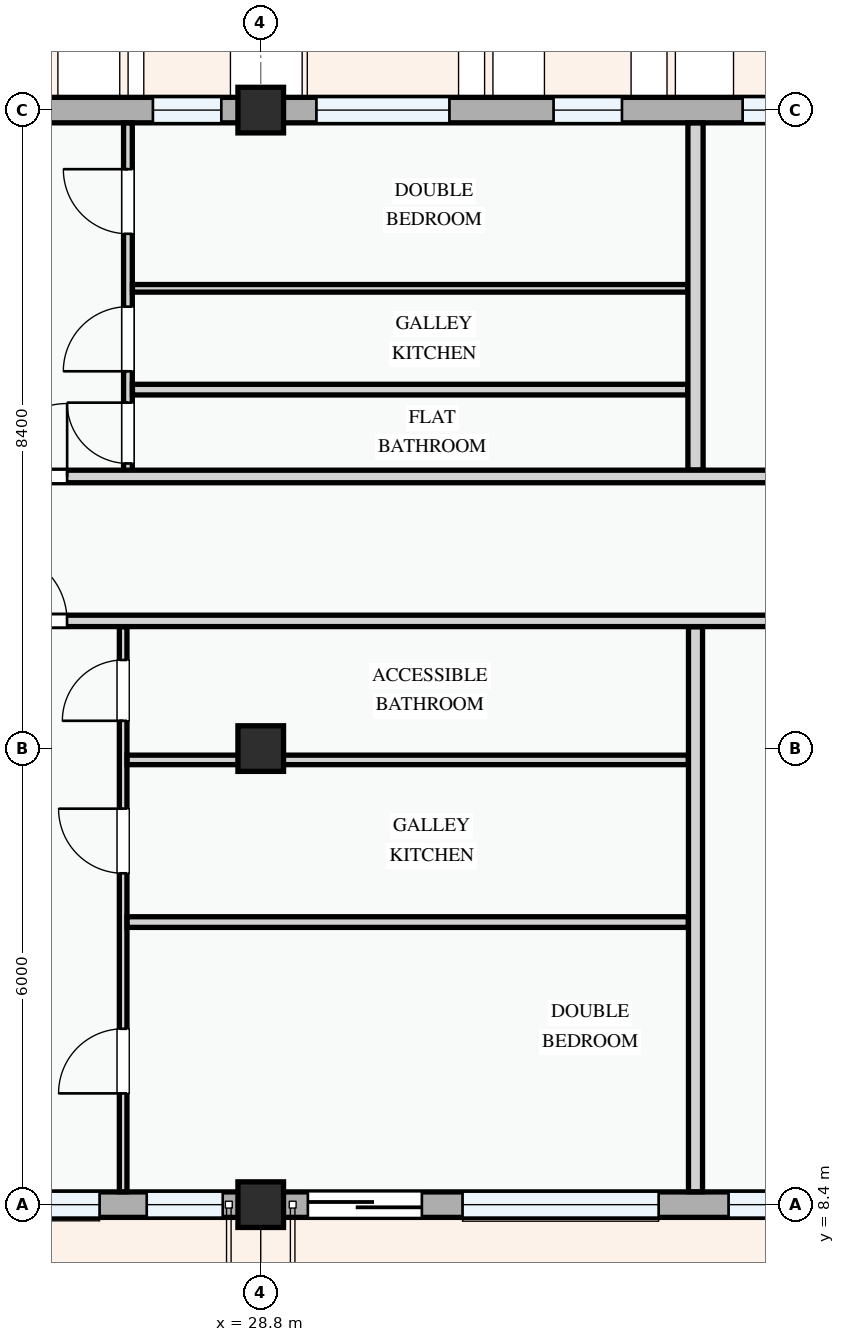
"""IFC4 building model, lengths in metres.
Left out: names, types, materials, properties, quantities, classifications, styles, units other than length and angle.
Written with IfcOpenShell. Run it as: python <this file> out.ifc"""

import sys

from ifc_helpers import new_model, si_unit, direction, frame, frame_2d, origin, origin_2d, place, context, subcontext, project, spatial, rectangle, extrude, element, fill, save


model = new_model("IFC4")
c1 = context("Model", 3, precision=1e-05, world=origin(), true_north=direction((0.0, 1.0)))
c2 = subcontext(c1, "Body", "Model", "MODEL_VIEW")
j1 = project(units=[si_unit("LENGTHUNIT", "METRE"), si_unit("PLANEANGLEUNIT", "RADIAN")], contexts=[c1])
p1 = place(None, origin())
s1 = spatial("IfcSite", under=j1, at=p1, CompositionType="ELEMENT")
p2 = place(p1, origin())
s2 = spatial("IfcBuilding", under=s1, at=p2, CompositionType="ELEMENT")
p3 = place(p2, frame((0.0, 0.0, 11.4)))
s3 = spatial("IfcBuildingStorey", under=s2, at=p3, CompositionType="ELEMENT", Elevation=11.4)
for number, where, z_axis, x_axis in (
    (1, (28.8, 8.4, 0.0), (0.0, 0.0, 1.0), (1.0, 0.0, 0.0)),
    (2, (28.8, 14.4, 0.0), (0.0, 0.0, 1.0), (1.0, 0.0, 0.0)),
    (3, (28.8, 22.8, 0.0), (0.0, 0.0, 1.0), (1.0, 0.0, 0.0)),
):
    element("IfcColumn", number, at=place(p3, frame(where, z_axis=z_axis, x_axis=x_axis)), inside=s3, PredefinedType="COLUMN", context=c2, shape_type="SweptSolid", body=[
        extrude(rectangle(XDim=0.6, YDim=0.6, at=origin_2d()), origin(), (0.0, 0.0, 1.0), 3.3),
    ])
p4 = place(p3, frame((22.8, 8.4, 0.0), z_axis=(0.0, 0.0, 1.0), x_axis=(1.0, 0.0, 0.0)))
e4 = element("IfcWall", 4, at=p4, inside=s3, PredefinedType="STANDARD", context=c2, shape_type="SweptSolid", body=[
    extrude(rectangle(XDim=6.0, YDim=0.335, at=frame_2d((3.0, 0.0))), origin(), (0.0, 0.0, 1.0), 2.475),
])
p5 = place(p4, frame((0.62, 0.0, 0.0)))
e5 = element("IfcOpeningElement", 5, at=p5, cuts=e4, PredefinedType="OPENING", context=c2, shape_type="SweptSolid", body=[
    extrude(rectangle(XDim=1.4, YDim=2.2, at=frame_2d((0.7, 1.1))), frame((0.0, 0.177, 0.0), z_axis=(0.0, -1.0, 0.0), x_axis=(1.0, 0.0, 0.0)), (0.0, 0.0, 1.0), 0.355),
])
p6 = place(p4, frame((2.38, 0.0, 0.78)))
e6 = element("IfcOpeningElement", 6, at=p6, cuts=e4, PredefinedType="OPENING", context=c2, shape_type="SweptSolid", body=[
    extrude(rectangle(XDim=1.5, YDim=1.5, at=frame_2d((0.75, 0.75))), frame((0.0, 0.177, 0.0), z_axis=(0.0, -1.0, 0.0), x_axis=(1.0, 0.0, 0.0)), (0.0, 0.0, 1.0), 0.355),
])
p7 = place(p4, frame((4.5, 0.0, 0.78)))
e7 = element("IfcOpeningElement", 7, at=p7, cuts=e4, PredefinedType="OPENING", context=c2, shape_type="SweptSolid", body=[
    extrude(rectangle(XDim=1.0, YDim=1.25, at=frame_2d((0.5, 0.625))), frame((0.0, 0.177, 0.0), z_axis=(0.0, -1.0, 0.0), x_axis=(1.0, 0.0, 0.0)), (0.0, 0.0, 1.0), 0.355),
])
p8 = place(p3, frame((28.8, 8.4, 0.0), z_axis=(0.0, 0.0, 1.0), x_axis=(1.0, 0.0, 0.0)))
e8 = element("IfcWall", 8, at=p8, inside=s3, PredefinedType="STANDARD", context=c2, shape_type="SweptSolid", body=[
    extrude(rectangle(XDim=8.4, YDim=0.335, at=frame_2d((4.2, 0.0))), origin(), (0.0, 0.0, 1.0), 2.375),
])
p9 = place(p8, frame((0.62, 0.0, 0.0)))
e9 = element("IfcOpeningElement", 9, at=p9, cuts=e8, PredefinedType="OPENING", context=c2, shape_type="SweptSolid", body=[
    extrude(rectangle(XDim=1.5, YDim=2.2, at=frame_2d((0.75, 1.1))), frame((0.0, 0.177, 0.0), z_axis=(0.0, -1.0, 0.0), x_axis=(1.0, 0.0, 0.0)), (0.0, 0.0, 1.0), 0.355),
])
p10 = place(p8, frame((2.655, 0.0, 0.78)))
e10 = element("IfcOpeningElement", 10, at=p10, cuts=e8, PredefinedType="OPENING", context=c2, shape_type="SweptSolid", body=[
    extrude(rectangle(XDim=2.58, YDim=1.48, at=frame_2d((1.29, 0.74))), frame((0.0, 0.177, 0.0), z_axis=(0.0, -1.0, 0.0), x_axis=(1.0, 0.0, 0.0)), (0.0, 0.0, 1.0), 0.355),
])
p11 = place(p8, frame((6.155, 0.0, 0.78)))
e11 = element("IfcOpeningElement", 11, at=p11, cuts=e8, PredefinedType="OPENING", context=c2, shape_type="SweptSolid", body=[
    extrude(rectangle(XDim=1.62, YDim=1.38, at=frame_2d((0.81, 0.69))), frame((0.0, 0.177, 0.0), z_axis=(0.0, -1.0, 0.0), x_axis=(1.0, 0.0, 0.0)), (0.0, 0.0, 1.0), 0.355),
])
p12 = place(p3, frame((37.2, 22.8, 0.0), z_axis=(0.0, 0.0, 1.0), x_axis=(-1.0, 0.0, 0.0)))
e12 = element("IfcWall", 12, at=p12, inside=s3, PredefinedType="STANDARD", context=c2, shape_type="SweptSolid", body=[
    extrude(rectangle(XDim=8.4, YDim=0.335, at=frame_2d((4.2, 0.0))), origin(), (0.0, 0.0, 1.0), 2.375),
])
p13 = place(p12, frame((0.81, 0.0, 0.78)))
e13 = element("IfcOpeningElement", 13, at=p13, cuts=e12, PredefinedType="OPENING", context=c2, shape_type="SweptSolid", body=[
    extrude(rectangle(XDim=1.25, YDim=1.3, at=frame_2d((0.625, 0.65))), frame((0.0, 0.177, 0.0), z_axis=(0.0, -1.0, 0.0), x_axis=(1.0, 0.0, 0.0)), (0.0, 0.0, 1.0), 0.355),
])
p14 = place(p12, frame((3.647, 0.0, 0.78)))
e14 = element("IfcOpeningElement", 14, at=p14, cuts=e12, PredefinedType="OPENING", context=c2, shape_type="SweptSolid", body=[
    extrude(rectangle(XDim=0.9, YDim=1.2, at=frame_2d((0.45, 0.6))), frame((0.0, 0.177, 0.0), z_axis=(0.0, -1.0, 0.0), x_axis=(1.0, 0.0, 0.0)), (0.0, 0.0, 1.0), 0.355),
])
p15 = place(p12, frame((5.917, 0.0, 0.78)))
e15 = element("IfcOpeningElement", 15, at=p15, cuts=e12, PredefinedType="OPENING", context=c2, shape_type="SweptSolid", body=[
    extrude(rectangle(XDim=1.75, YDim=1.45, at=frame_2d((0.875, 0.725))), frame((0.0, 0.177, 0.0), z_axis=(0.0, -1.0, 0.0), x_axis=(1.0, 0.0, 0.0)), (0.0, 0.0, 1.0), 0.355),
])
p16 = place(p3, frame((28.8, 22.8, 0.0), z_axis=(0.0, 0.0, 1.0), x_axis=(-1.0, 0.0, 0.0)))
e16 = element("IfcWall", 16, at=p16, inside=s3, PredefinedType="STANDARD", context=c2, shape_type="SweptSolid", body=[
    extrude(rectangle(XDim=6.0, YDim=0.335, at=frame_2d((3.0, 0.0))), origin(), (0.0, 0.0, 1.0), 2.475),
])
p17 = place(p16, frame((0.519, 0.0, 0.78)))
e17 = element("IfcOpeningElement", 17, at=p17, cuts=e16, PredefinedType="OPENING", context=c2, shape_type="SweptSolid", body=[
    extrude(rectangle(XDim=0.9, YDim=1.2, at=frame_2d((0.45, 0.6))), frame((0.0, 0.177, 0.0), z_axis=(0.0, -1.0, 0.0), x_axis=(1.0, 0.0, 0.0)), (0.0, 0.0, 1.0), 0.355),
])
p18 = place(p16, frame((2.789, 0.0, 0.78)))
e18 = element("IfcOpeningElement", 18, at=p18, cuts=e16, PredefinedType="OPENING", context=c2, shape_type="SweptSolid", body=[
    extrude(rectangle(XDim=1.98, YDim=1.5, at=frame_2d((0.99, 0.75))), frame((0.0, 0.177, 0.0), z_axis=(0.0, -1.0, 0.0), x_axis=(1.0, 0.0, 0.0)), (0.0, 0.0, 1.0), 0.355),
])
p19 = place(p3, frame((26.99, 8.57, 0.0), z_axis=(0.0, 0.0, 1.0), x_axis=(0.0, 1.0, 0.0)))
e19 = element("IfcWall", 19, at=p19, inside=s3, PredefinedType="PARTITIONING", context=c2, shape_type="SweptSolid", body=[
    extrude(rectangle(XDim=7.433, YDim=0.1, at=frame_2d((3.717, 0.0))), origin(), (0.0, 0.0, 1.0), 3.0),
])
p20 = place(p19, frame((1.294, 0.0, 0.0)))
e20 = element("IfcOpeningElement", 20, at=p20, cuts=e19, PredefinedType="OPENING", context=c2, shape_type="SweptSolid", body=[
    extrude(rectangle(XDim=0.85, YDim=2.1, at=frame_2d((0.425, 1.05))), frame((0.0, 0.06, 0.0), z_axis=(0.0, -1.0, 0.0), x_axis=(1.0, 0.0, 0.0)), (0.0, 0.0, 1.0), 0.12),
])
p21 = place(p19, frame((4.19, 0.0, 0.0)))
e21 = element("IfcOpeningElement", 21, at=p21, cuts=e19, PredefinedType="OPENING", context=c2, shape_type="SweptSolid", body=[
    extrude(rectangle(XDim=0.85, YDim=2.1, at=frame_2d((0.425, 1.05))), frame((0.0, 0.06, 0.0), z_axis=(0.0, -1.0, 0.0), x_axis=(1.0, 0.0, 0.0)), (0.0, 0.0, 1.0), 0.12),
])
p22 = place(p19, frame((6.196, 0.0, 0.0)))
e22 = element("IfcOpeningElement", 22, at=p22, cuts=e19, PredefinedType="OPENING", context=c2, shape_type="SweptSolid", body=[
    extrude(rectangle(XDim=0.8, YDim=2.1, at=frame_2d((0.4, 1.05))), frame((0.0, 0.06, 0.0), z_axis=(0.0, -1.0, 0.0), x_axis=(1.0, 0.0, 0.0)), (0.0, 0.0, 1.0), 0.12),
])
p23 = place(p3, frame((27.042, 12.118, 0.0), z_axis=(0.0, 0.0, 1.0), x_axis=(1.0, 0.0, 0.0)))
e23 = element("IfcWall", 23, at=p23, inside=s3, PredefinedType="PARTITIONING", context=c2, shape_type="SweptSolid", body=[
    extrude(rectangle(XDim=7.384, YDim=0.14, at=frame_2d((3.692, 0.0))), origin(), (0.0, 0.0, 1.0), 3.0),
])
p24 = place(p3, frame((27.042, 14.251, 0.0), z_axis=(0.0, 0.0, 1.0), x_axis=(1.0, 0.0, 0.0)))
e24 = element("IfcWall", 24, at=p24, inside=s3, PredefinedType="PARTITIONING", context=c2, shape_type="SweptSolid", body=[
    extrude(rectangle(XDim=7.384, YDim=0.125, at=frame_2d((3.692, 0.0))), origin(), (0.0, 0.0, 1.0), 2.375),
])
p25 = place(p3, frame((27.053, 17.98, 0.0), z_axis=(0.0, 0.0, 1.0), x_axis=(0.0, 1.0, 0.0)))
e25 = element("IfcWall", 25, at=p25, inside=s3, PredefinedType="PARTITIONING", context=c2, shape_type="SweptSolid", body=[
    extrude(rectangle(XDim=4.651, YDim=0.115, at=frame_2d((2.325, 0.0))), origin(), (0.0, 0.0, 1.0), 3.0),
])
p26 = place(p25, frame((0.171, 0.0, 0.0)))
e26 = element("IfcOpeningElement", 26, at=p26, cuts=e25, PredefinedType="OPENING", context=c2, shape_type="SweptSolid", body=[
    extrude(rectangle(XDim=0.8, YDim=2.1, at=frame_2d((0.4, 1.05))), frame((0.0, 0.067, 0.0), z_axis=(0.0, -1.0, 0.0), x_axis=(1.0, 0.0, 0.0)), (0.0, 0.0, 1.0), 0.135),
])
p27 = place(p25, frame((1.384, 0.0, 0.0)))
e27 = element("IfcOpeningElement", 27, at=p27, cuts=e25, PredefinedType="OPENING", context=c2, shape_type="SweptSolid", body=[
    extrude(rectangle(XDim=0.85, YDim=2.1, at=frame_2d((0.425, 1.05))), frame((0.0, 0.067, 0.0), z_axis=(0.0, -1.0, 0.0), x_axis=(1.0, 0.0, 0.0)), (0.0, 0.0, 1.0), 0.135),
])
p28 = place(p25, frame((3.193, 0.0, 0.0)))
e28 = element("IfcOpeningElement", 28, at=p28, cuts=e25, PredefinedType="OPENING", context=c2, shape_type="SweptSolid", body=[
    extrude(rectangle(XDim=0.85, YDim=2.1, at=frame_2d((0.425, 1.05))), frame((0.0, 0.067, 0.0), z_axis=(0.0, -1.0, 0.0), x_axis=(1.0, 0.0, 0.0)), (0.0, 0.0, 1.0), 0.135),
])
p29 = place(p3, frame((27.112, 20.455, 0.0), z_axis=(0.0, 0.0, 1.0), x_axis=(1.0, 0.0, 0.0)))
e29 = element("IfcWall", 29, at=p29, inside=s3, PredefinedType="PARTITIONING", context=c2, shape_type="SweptSolid", body=[
    extrude(rectangle(XDim=7.306, YDim=0.1, at=frame_2d((3.653, 0.0))), origin(), (0.0, 0.0, 1.0), 3.0),
])
p30 = place(p3, frame((27.112, 19.122, 0.0), z_axis=(0.0, 0.0, 1.0), x_axis=(1.0, 0.0, 0.0)))
e30 = element("IfcWall", 30, at=p30, inside=s3, PredefinedType="PARTITIONING", context=c2, shape_type="SweptSolid", body=[
    extrude(rectangle(XDim=7.306, YDim=0.14, at=frame_2d((3.653, 0.0))), origin(), (0.0, 0.0, 1.0), 3.0),
])
p31 = place(p3, frame((34.52, 8.57, 0.0), z_axis=(0.0, 0.0, 1.0), x_axis=(0.0, 1.0, 0.0)))
e31 = element("IfcWall", 31, at=p31, inside=s3, PredefinedType="PARTITIONING", context=c2, shape_type="SweptSolid", body=[
    extrude(rectangle(XDim=7.433, YDim=0.185, at=frame_2d((3.717, 0.0))), origin(), (0.0, 0.0, 1.0), 3.0),
])
p32 = place(p3, frame((34.52, 18.064, 0.0), z_axis=(0.0, 0.0, 1.0), x_axis=(0.0, 1.0, 0.0)))
e32 = element("IfcWall", 32, at=p32, inside=s3, PredefinedType="PARTITIONING", context=c2, shape_type="SweptSolid", body=[
    extrude(rectangle(XDim=4.566, YDim=0.2, at=frame_2d((2.283, 0.0))), origin(), (0.0, 0.0, 1.0), 3.0),
])
p33 = place(p3, frame((22.66, 16.08, 0.0), z_axis=(0.0, 0.0, 1.0), x_axis=(1.0, 0.0, 0.0)))
e33 = element("IfcWall", 33, at=p33, inside=s3, PredefinedType="PARTITIONING", context=c2, shape_type="SweptSolid", body=[
    extrude(rectangle(XDim=34.88, YDim=0.15, at=frame_2d((17.44, 0.0))), origin(), (0.0, 0.0, 1.0), 3.0),
])
p34 = place(p33, frame((2.672, 0.0, 0.0)))
e34 = element("IfcOpeningElement", 34, at=p34, cuts=e33, PredefinedType="OPENING", context=c2, shape_type="SweptSolid", body=[
    extrude(rectangle(XDim=0.92, YDim=2.1, at=frame_2d((0.46, 1.05))), frame((0.0, 0.085, 0.0), z_axis=(0.0, -1.0, 0.0), x_axis=(1.0, 0.0, 0.0)), (0.0, 0.0, 1.0), 0.17),
])
p35 = place(p33, frame((16.58, 0.0, 0.0)))
e35 = element("IfcOpeningElement", 35, at=p35, cuts=e33, PredefinedType="OPENING", context=c2, shape_type="SweptSolid", body=[
    extrude(rectangle(XDim=0.92, YDim=2.1, at=frame_2d((0.46, 1.05))), frame((0.0, 0.085, 0.0), z_axis=(0.0, -1.0, 0.0), x_axis=(1.0, 0.0, 0.0)), (0.0, 0.0, 1.0), 0.17),
])
p36 = place(p33, frame((24.315, 0.0, 0.0)))
e36 = element("IfcOpeningElement", 36, at=p36, cuts=e33, PredefinedType="OPENING", context=c2, shape_type="SweptSolid", body=[
    extrude(rectangle(XDim=0.92, YDim=2.1, at=frame_2d((0.46, 1.05))), frame((0.0, 0.085, 0.0), z_axis=(0.0, -1.0, 0.0), x_axis=(1.0, 0.0, 0.0)), (0.0, 0.0, 1.0), 0.17),
])
p37 = place(p3, frame((22.66, 17.98, 0.0), z_axis=(0.0, 0.0, 1.0), x_axis=(1.0, 0.0, 0.0)))
e37 = element("IfcWall", 37, at=p37, inside=s3, PredefinedType="PARTITIONING", context=c2, shape_type="SweptSolid", body=[
    extrude(rectangle(XDim=34.88, YDim=0.165, at=frame_2d((17.44, 0.0))), origin(), (0.0, 0.0, 1.0), 3.0),
])
p38 = place(p37, frame((2.633, 0.0, 0.0)))
e38 = element("IfcOpeningElement", 38, at=p38, cuts=e37, PredefinedType="OPENING", context=c2, shape_type="SweptSolid", body=[
    extrude(rectangle(XDim=0.96, YDim=2.12, at=frame_2d((0.48, 1.06))), frame((0.0, 0.093, 0.0), z_axis=(0.0, -1.0, 0.0), x_axis=(1.0, 0.0, 0.0)), (0.0, 0.0, 1.0), 0.185),
])
p39 = place(p37, frame((16.343, 0.0, 0.0)))
e39 = element("IfcOpeningElement", 39, at=p39, cuts=e37, PredefinedType="OPENING", context=c2, shape_type="SweptSolid", body=[
    extrude(rectangle(XDim=0.92, YDim=2.1, at=frame_2d((0.46, 1.05))), frame((0.0, 0.093, 0.0), z_axis=(0.0, -1.0, 0.0), x_axis=(1.0, 0.0, 0.0)), (0.0, 0.0, 1.0), 0.185),
])
p40 = place(p37, frame((24.313, 0.0, 0.0)))
e40 = element("IfcOpeningElement", 40, at=p40, cuts=e37, PredefinedType="OPENING", context=c2, shape_type="SweptSolid", body=[
    extrude(rectangle(XDim=0.92, YDim=2.1, at=frame_2d((0.46, 1.05))), frame((0.0, 0.093, 0.0), z_axis=(0.0, -1.0, 0.0), x_axis=(1.0, 0.0, 0.0)), (0.0, 0.0, 1.0), 0.185),
])
p41 = place(p6, origin())
e41 = element("IfcWindow", 41, at=p41, inside=s3, PartitioningType="SINGLE_PANEL", PredefinedType="WINDOW", context=c2, shape_type="SweptSolid", body=[
    extrude(rectangle(XDim=1.5, YDim=1.5, at=frame_2d((0.75, 0.75))), frame((0.0, 0.03, 0.0), z_axis=(0.0, -1.0, 0.0), x_axis=(1.0, 0.0, 0.0)), (0.0, 0.0, 1.0), 0.06),
])
fill(e6, e41)
p42 = place(p7, origin())
e42 = element("IfcWindow", 42, at=p42, inside=s3, PartitioningType="SINGLE_PANEL", PredefinedType="WINDOW", context=c2, shape_type="SweptSolid", body=[
    extrude(rectangle(XDim=1.0, YDim=1.25, at=frame_2d((0.5, 0.625))), frame((0.0, 0.03, 0.0), z_axis=(0.0, -1.0, 0.0), x_axis=(1.0, 0.0, 0.0)), (0.0, 0.0, 1.0), 0.06),
])
fill(e7, e42)
p43 = place(p9, frame((1.5, 0.0, 0.0), z_axis=(0.0, 0.0, 1.0), x_axis=(-1.0, 0.0, 0.0)))
e43 = element("IfcDoor", 43, at=p43, inside=s3, OperationType="SLIDING_TO_RIGHT", PredefinedType="DOOR", context=c2, shape_type="SweptSolid", body=[
    extrude(rectangle(XDim=1.5, YDim=2.2, at=frame_2d((0.75, 1.1))), frame((0.0, 0.025, 0.0), z_axis=(0.0, -1.0, 0.0), x_axis=(1.0, 0.0, 0.0)), (0.0, 0.0, 1.0), 0.05),
])
fill(e9, e43)
p44 = place(p10, origin())
e44 = element("IfcWindow", 44, at=p44, inside=s3, PartitioningType="DOUBLE_PANEL_VERTICAL", PredefinedType="WINDOW", context=c2, shape_type="SweptSolid", body=[
    extrude(rectangle(XDim=2.58, YDim=1.48, at=frame_2d((1.29, 0.74))), frame((0.0, 0.03, 0.0), z_axis=(0.0, -1.0, 0.0), x_axis=(1.0, 0.0, 0.0)), (0.0, 0.0, 1.0), 0.06),
])
fill(e10, e44)
p45 = place(p11, origin())
e45 = element("IfcWindow", 45, at=p45, inside=s3, PartitioningType="DOUBLE_PANEL_VERTICAL", PredefinedType="WINDOW", context=c2, shape_type="SweptSolid", body=[
    extrude(rectangle(XDim=1.62, YDim=1.38, at=frame_2d((0.81, 0.69))), frame((0.0, 0.03, 0.0), z_axis=(0.0, -1.0, 0.0), x_axis=(1.0, 0.0, 0.0)), (0.0, 0.0, 1.0), 0.06),
])
fill(e11, e45)
p46 = place(p13, origin())
e46 = element("IfcWindow", 46, at=p46, inside=s3, PartitioningType="SINGLE_PANEL", PredefinedType="WINDOW", context=c2, shape_type="SweptSolid", body=[
    extrude(rectangle(XDim=1.25, YDim=1.3, at=frame_2d((0.625, 0.65))), frame((0.0, 0.03, 0.0), z_axis=(0.0, -1.0, 0.0), x_axis=(1.0, 0.0, 0.0)), (0.0, 0.0, 1.0), 0.06),
])
fill(e13, e46)
p47 = place(p14, origin())
e47 = element("IfcWindow", 47, at=p47, inside=s3, PartitioningType="SINGLE_PANEL", PredefinedType="WINDOW", context=c2, shape_type="SweptSolid", body=[
    extrude(rectangle(XDim=0.9, YDim=1.2, at=frame_2d((0.45, 0.6))), frame((0.0, 0.03, 0.0), z_axis=(0.0, -1.0, 0.0), x_axis=(1.0, 0.0, 0.0)), (0.0, 0.0, 1.0), 0.06),
])
fill(e14, e47)
p48 = place(p15, origin())
e48 = element("IfcWindow", 48, at=p48, inside=s3, PartitioningType="DOUBLE_PANEL_VERTICAL", PredefinedType="WINDOW", context=c2, shape_type="SweptSolid", body=[
    extrude(rectangle(XDim=1.75, YDim=1.45, at=frame_2d((0.875, 0.725))), frame((0.0, 0.03, 0.0), z_axis=(0.0, -1.0, 0.0), x_axis=(1.0, 0.0, 0.0)), (0.0, 0.0, 1.0), 0.06),
])
fill(e15, e48)
p49 = place(p17, origin())
e49 = element("IfcWindow", 49, at=p49, inside=s3, PartitioningType="SINGLE_PANEL", PredefinedType="WINDOW", context=c2, shape_type="SweptSolid", body=[
    extrude(rectangle(XDim=0.9, YDim=1.2, at=frame_2d((0.45, 0.6))), frame((0.0, 0.03, 0.0), z_axis=(0.0, -1.0, 0.0), x_axis=(1.0, 0.0, 0.0)), (0.0, 0.0, 1.0), 0.06),
])
fill(e17, e49)
p50 = place(p20, origin())
e50 = element("IfcDoor", 50, at=p50, inside=s3, OperationType="SINGLE_SWING_LEFT", PredefinedType="DOOR", context=c2, shape_type="SweptSolid", body=[
    extrude(rectangle(XDim=0.85, YDim=2.1, at=frame_2d((0.425, 1.05))), frame((0.0, 0.025, 0.0), z_axis=(0.0, -1.0, 0.0), x_axis=(1.0, 0.0, 0.0)), (0.0, 0.0, 1.0), 0.05),
])
fill(e20, e50)
p51 = place(p21, origin())
e51 = element("IfcDoor", 51, at=p51, inside=s3, OperationType="SINGLE_SWING_RIGHT", PredefinedType="DOOR", context=c2, shape_type="SweptSolid", body=[
    extrude(rectangle(XDim=0.85, YDim=2.1, at=frame_2d((0.425, 1.05))), frame((0.0, 0.025, 0.0), z_axis=(0.0, -1.0, 0.0), x_axis=(1.0, 0.0, 0.0)), (0.0, 0.0, 1.0), 0.05),
])
fill(e21, e51)
p52 = place(p22, origin())
e52 = element("IfcDoor", 52, at=p52, inside=s3, OperationType="SINGLE_SWING_LEFT", PredefinedType="DOOR", context=c2, shape_type="SweptSolid", body=[
    extrude(rectangle(XDim=0.8, YDim=2.1, at=frame_2d((0.4, 1.05))), frame((0.0, 0.025, 0.0), z_axis=(0.0, -1.0, 0.0), x_axis=(1.0, 0.0, 0.0)), (0.0, 0.0, 1.0), 0.05),
])
fill(e22, e52)
p53 = place(p26, origin())
e53 = element("IfcDoor", 53, at=p53, inside=s3, OperationType="SINGLE_SWING_RIGHT", PredefinedType="DOOR", context=c2, shape_type="SweptSolid", body=[
    extrude(rectangle(XDim=0.8, YDim=2.1, at=frame_2d((0.4, 1.05))), frame((0.0, 0.025, 0.0), z_axis=(0.0, -1.0, 0.0), x_axis=(1.0, 0.0, 0.0)), (0.0, 0.0, 1.0), 0.05),
])
fill(e26, e53)
p54 = place(p27, origin())
e54 = element("IfcDoor", 54, at=p54, inside=s3, OperationType="SINGLE_SWING_LEFT", PredefinedType="DOOR", context=c2, shape_type="SweptSolid", body=[
    extrude(rectangle(XDim=0.85, YDim=2.1, at=frame_2d((0.425, 1.05))), frame((0.0, 0.025, 0.0), z_axis=(0.0, -1.0, 0.0), x_axis=(1.0, 0.0, 0.0)), (0.0, 0.0, 1.0), 0.05),
])
fill(e27, e54)
p55 = place(p28, origin())
e55 = element("IfcDoor", 55, at=p55, inside=s3, OperationType="SINGLE_SWING_RIGHT", PredefinedType="DOOR", context=c2, shape_type="SweptSolid", body=[
    extrude(rectangle(XDim=0.85, YDim=2.1, at=frame_2d((0.425, 1.05))), frame((0.0, 0.025, 0.0), z_axis=(0.0, -1.0, 0.0), x_axis=(1.0, 0.0, 0.0)), (0.0, 0.0, 1.0), 0.05),
])
fill(e28, e55)
p56 = place(p34, origin())
e56 = element("IfcDoor", 56, at=p56, inside=s3, OperationType="SINGLE_SWING_LEFT", PredefinedType="DOOR", context=c2, shape_type="SweptSolid", body=[
    extrude(rectangle(XDim=0.92, YDim=2.1, at=frame_2d((0.46, 1.05))), frame((0.0, 0.025, 0.0), z_axis=(0.0, -1.0, 0.0), x_axis=(1.0, 0.0, 0.0)), (0.0, 0.0, 1.0), 0.05),
])
fill(e34, e56)
p57 = place(p38, origin())
e57 = element("IfcDoor", 57, at=p57, inside=s3, OperationType="SINGLE_SWING_RIGHT", PredefinedType="DOOR", context=c2, shape_type="SweptSolid", body=[
    extrude(rectangle(XDim=0.96, YDim=2.12, at=frame_2d((0.48, 1.06))), frame((0.0, 0.025, 0.0), z_axis=(0.0, -1.0, 0.0), x_axis=(1.0, 0.0, 0.0)), (0.0, 0.0, 1.0), 0.05),
])
fill(e38, e57)
save(model, sys.argv[1])
